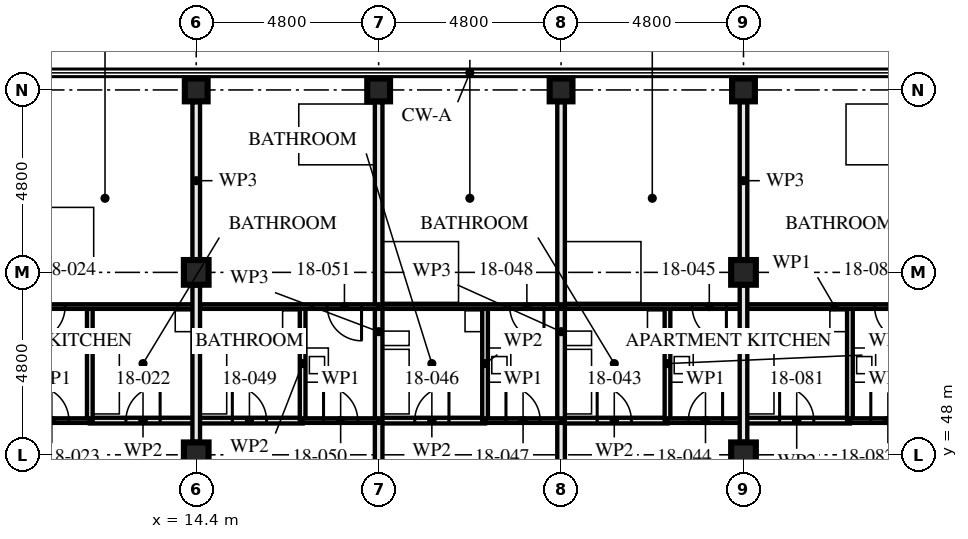
"""IFC4 building model, lengths in metres.
Left out: names, types, materials, properties, quantities, classifications, styles, units other than length and angle.
Written with IfcOpenShell. Run it as: python <this file> out.ifc"""

import sys

from ifc_helpers import new_model, si_unit, direction, frame, frame_2d, origin, origin_2d, place, context, subcontext, project, spatial, rectangle, hollow_rectangle, extrude, element, fill, save


model = new_model("IFC4")
c1 = context("Model", 3, precision=1e-05, world=origin(), true_north=direction((0.0, 1.0)))
c2 = subcontext(c1, "Body", "Model", "MODEL_VIEW")
j1 = project(units=[si_unit("LENGTHUNIT", "METRE"), si_unit("PLANEANGLEUNIT", "RADIAN")], contexts=[c1])
p1 = place(None, origin())
s1 = spatial("IfcSite", under=j1, at=p1, CompositionType="ELEMENT")
p2 = place(p1, origin())
s2 = spatial("IfcBuilding", under=s1, at=p2, CompositionType="ELEMENT")
p3 = place(p2, frame((0.0, 0.0, 69.0)))
s3 = spatial("IfcBuildingStorey", under=s2, at=p3, CompositionType="ELEMENT", Elevation=69.0)
for number, where, z_axis, x_axis in (
    (1, (14.4, 48.0, 0.0), (0.0, 0.0, 1.0), (1.0, 0.0, 0.0)),
    (2, (14.4, 52.8, 0.0), (0.0, 0.0, 1.0), (1.0, 0.0, 0.0)),
):
    element("IfcColumn", number, at=place(p3, frame(where, z_axis=z_axis, x_axis=x_axis)), inside=s3, PredefinedType="COLUMN", context=c2, shape_type="SweptSolid", body=[
        extrude(hollow_rectangle(XDim=0.65, YDim=0.65, WallThickness=0.05, at=origin_2d()), origin(), (0.0, 0.0, 1.0), 3.5),
    ])
for number, where, z_axis, x_axis in (
    (3, (14.4, 57.6, 0.0), (0.0, 0.0, 1.0), (0.0, 1.0, 0.0)),
    (4, (19.2, 57.6, 0.0), (0.0, 0.0, 1.0), (0.0, 1.0, 0.0)),
    (5, (24.0, 57.6, 0.0), (0.0, 0.0, 1.0), (0.0, 1.0, 0.0)),
):
    element("IfcColumn", number, at=place(p3, frame(where, z_axis=z_axis, x_axis=x_axis)), inside=s3, PredefinedType="COLUMN", context=c2, shape_type="SweptSolid", body=[
        extrude(hollow_rectangle(XDim=0.6, YDim=0.6, WallThickness=0.08, at=origin_2d()), origin(), (0.0, 0.0, 1.0), 3.5),
    ])
for number, where, z_axis, x_axis in (
    (6, (28.8, 48.0, 0.0), (0.0, 0.0, 1.0), (1.0, 0.0, 0.0)),
    (7, (28.8, 52.8, 0.0), (0.0, 0.0, 1.0), (1.0, 0.0, 0.0)),
):
    element("IfcColumn", number, at=place(p3, frame(where, z_axis=z_axis, x_axis=x_axis)), inside=s3, PredefinedType="COLUMN", context=c2, shape_type="SweptSolid", body=[
        extrude(hollow_rectangle(XDim=0.65, YDim=0.65, WallThickness=0.05, at=origin_2d()), origin(), (0.0, 0.0, 1.0), 3.5),
    ])
p4 = place(p3, frame((28.8, 57.6, 0.0), z_axis=(0.0, 0.0, 1.0), x_axis=(0.0, 1.0, 0.0)))
e8 = element("IfcColumn", 8, at=p4, inside=s3, PredefinedType="COLUMN", context=c2, shape_type="SweptSolid", body=[
    extrude(hollow_rectangle(XDim=0.6, YDim=0.6, WallThickness=0.08, at=origin_2d()), origin(), (0.0, 0.0, 1.0), 3.5),
])
p5 = place(p3, frame((11.6, 51.9, 0.0), z_axis=(0.0, 0.0, 1.0), x_axis=(0.0, -1.0, 0.0)))
e9 = element("IfcWall", 9, at=p5, inside=s3, PredefinedType="PARTITIONING", context=c2, shape_type="SweptSolid", body=[
    extrude(rectangle(XDim=3.0, YDim=0.15, at=frame_2d((1.5, 0.0))), origin(), (0.0, 0.0, 1.0), 3.33),
])
p6 = place(p3, frame((14.4, 48.9, 0.0), z_axis=(0.0, 0.0, 1.0), x_axis=(-1.0, 0.0, 0.0)))
e10 = element("IfcWall", 10, at=p6, inside=s3, PredefinedType="PARTITIONING", context=c2, shape_type="SweptSolid", body=[
    extrude(rectangle(XDim=2.8, YDim=0.15, at=frame_2d((1.4, 0.0))), origin(), (0.0, 0.0, 1.0), 3.33),
])
p7 = place(p6, frame((0.95, 0.0, 0.0)))
e11 = element("IfcOpeningElement", 11, at=p7, cuts=e10, PredefinedType="OPENING", context=c2, shape_type="SweptSolid", body=[
    extrude(rectangle(XDim=0.9, YDim=2.1, at=frame_2d((0.45, 1.05))), frame((0.0, 0.085, 0.0), z_axis=(0.0, -1.0, 0.0), x_axis=(1.0, 0.0, 0.0)), (0.0, 0.0, 1.0), 0.171),
])
p8 = place(p3, frame((11.6, 48.9, 0.0), z_axis=(0.0, 0.0, 1.0), x_axis=(-1.0, 0.0, 0.0)))
e12 = element("IfcWall", 12, at=p8, inside=s3, PredefinedType="PARTITIONING", context=c2, shape_type="SweptSolid", body=[
    extrude(rectangle(XDim=2.0, YDim=0.12, at=frame_2d((1.0, 0.0))), origin(), (0.0, 0.0, 1.0), 3.33),
])
p9 = place(p8, frame((0.55, 0.0, 0.0)))
e13 = element("IfcOpeningElement", 13, at=p9, cuts=e12, PredefinedType="OPENING", context=c2, shape_type="SweptSolid", body=[
    extrude(rectangle(XDim=0.9, YDim=2.1, at=frame_2d((0.45, 1.05))), frame((0.0, 0.071, 0.0), z_axis=(0.0, -1.0, 0.0), x_axis=(1.0, 0.0, 0.0)), (0.0, 0.0, 1.0), 0.141),
])
p10 = place(p3, frame((14.4, 51.9, 0.0), z_axis=(0.0, 0.0, 1.0), x_axis=(-1.0, 0.0, 0.0)))
e14 = element("IfcWall", 14, at=p10, inside=s3, PredefinedType="PARTITIONING", context=c2, shape_type="SweptSolid", body=[
    extrude(rectangle(XDim=4.8, YDim=0.12, at=frame_2d((2.4, 0.0))), origin(), (0.0, 0.0, 1.0), 3.33),
])
p11 = place(p10, frame((3.45, 0.0, 0.0)))
e15 = element("IfcOpeningElement", 15, at=p11, cuts=e14, PredefinedType="OPENING", context=c2, shape_type="SweptSolid", body=[
    extrude(rectangle(XDim=0.9, YDim=2.1, at=frame_2d((0.45, 1.05))), frame((0.0, 0.071, 0.0), z_axis=(0.0, -1.0, 0.0), x_axis=(1.0, 0.0, 0.0)), (0.0, 0.0, 1.0), 0.141),
])
p12 = place(p3, frame((26.8, 51.9, 0.0), z_axis=(0.0, 0.0, 1.0), x_axis=(0.0, -1.0, 0.0)))
e16 = element("IfcWall", 16, at=p12, inside=s3, PredefinedType="PARTITIONING", context=c2, shape_type="SweptSolid", body=[
    extrude(rectangle(XDim=3.0, YDim=0.15, at=frame_2d((1.5, 0.0))), origin(), (0.0, 0.0, 1.0), 3.33),
])
p13 = place(p3, frame((26.8, 48.9, 0.0), z_axis=(0.0, 0.0, 1.0), x_axis=(-1.0, 0.0, 0.0)))
e17 = element("IfcWall", 17, at=p13, inside=s3, PredefinedType="PARTITIONING", context=c2, shape_type="SweptSolid", body=[
    extrude(rectangle(XDim=2.8, YDim=0.15, at=frame_2d((1.4, 0.0))), origin(), (0.0, 0.0, 1.0), 3.33),
])
p14 = place(p13, frame((0.95, 0.0, 0.0)))
e18 = element("IfcOpeningElement", 18, at=p14, cuts=e17, PredefinedType="OPENING", context=c2, shape_type="SweptSolid", body=[
    extrude(rectangle(XDim=0.9, YDim=2.1, at=frame_2d((0.45, 1.05))), frame((0.0, 0.085, 0.0), z_axis=(0.0, -1.0, 0.0), x_axis=(1.0, 0.0, 0.0)), (0.0, 0.0, 1.0), 0.171),
])
p15 = place(p3, frame((28.8, 48.9, 0.0), z_axis=(0.0, 0.0, 1.0), x_axis=(-1.0, 0.0, 0.0)))
e19 = element("IfcWall", 19, at=p15, inside=s3, PredefinedType="PARTITIONING", context=c2, shape_type="SweptSolid", body=[
    extrude(rectangle(XDim=2.0, YDim=0.12, at=frame_2d((1.0, 0.0))), origin(), (0.0, 0.0, 1.0), 3.33),
])
p16 = place(p15, frame((0.55, 0.0, 0.0)))
e20 = element("IfcOpeningElement", 20, at=p16, cuts=e19, PredefinedType="OPENING", context=c2, shape_type="SweptSolid", body=[
    extrude(rectangle(XDim=0.9, YDim=2.1, at=frame_2d((0.45, 1.05))), frame((0.0, 0.071, 0.0), z_axis=(0.0, -1.0, 0.0), x_axis=(1.0, 0.0, 0.0)), (0.0, 0.0, 1.0), 0.141),
])
p17 = place(p3, frame((28.8, 51.9, 0.0), z_axis=(0.0, 0.0, 1.0), x_axis=(-1.0, 0.0, 0.0)))
e21 = element("IfcWall", 21, at=p17, inside=s3, PredefinedType="PARTITIONING", context=c2, shape_type="SweptSolid", body=[
    extrude(rectangle(XDim=4.8, YDim=0.12, at=frame_2d((2.4, 0.0))), origin(), (0.0, 0.0, 1.0), 3.33),
])
p18 = place(p17, frame((0.45, 0.0, 0.0)))
e22 = element("IfcOpeningElement", 22, at=p18, cuts=e21, PredefinedType="OPENING", context=c2, shape_type="SweptSolid", body=[
    extrude(rectangle(XDim=0.9, YDim=2.1, at=frame_2d((0.45, 1.05))), frame((0.0, 0.071, 0.0), z_axis=(0.0, -1.0, 0.0), x_axis=(1.0, 0.0, 0.0)), (0.0, 0.0, 1.0), 0.141),
])
p19 = place(p3, frame((24.0, 57.28, 0.0), z_axis=(0.0, 0.0, 1.0), x_axis=(0.0, -1.0, 0.0)))
e23 = element("IfcWall", 23, at=p19, inside=s3, PredefinedType="PARTITIONING", context=c2, shape_type="SweptSolid", body=[
    extrude(rectangle(XDim=12.08, YDim=0.2, at=frame_2d((6.04, 0.0))), origin(), (0.0, 0.0, 1.0), 2.55),
])
p20 = place(p3, frame((22.0, 51.9, 0.0), z_axis=(0.0, 0.0, 1.0), x_axis=(0.0, -1.0, 0.0)))
e24 = element("IfcWall", 24, at=p20, inside=s3, PredefinedType="PARTITIONING", context=c2, shape_type="SweptSolid", body=[
    extrude(rectangle(XDim=3.0, YDim=0.15, at=frame_2d((1.5, 0.0))), origin(), (0.0, 0.0, 1.0), 3.33),
])
p21 = place(p3, frame((22.0, 48.9, 0.0), z_axis=(0.0, 0.0, 1.0), x_axis=(-1.0, 0.0, 0.0)))
e25 = element("IfcWall", 25, at=p21, inside=s3, PredefinedType="PARTITIONING", context=c2, shape_type="SweptSolid", body=[
    extrude(rectangle(XDim=2.8, YDim=0.15, at=frame_2d((1.4, 0.0))), origin(), (0.0, 0.0, 1.0), 3.33),
])
p22 = place(p21, frame((0.95, 0.0, 0.0)))
e26 = element("IfcOpeningElement", 26, at=p22, cuts=e25, PredefinedType="OPENING", context=c2, shape_type="SweptSolid", body=[
    extrude(rectangle(XDim=0.9, YDim=2.1, at=frame_2d((0.45, 1.05))), frame((0.0, 0.085, 0.0), z_axis=(0.0, -1.0, 0.0), x_axis=(1.0, 0.0, 0.0)), (0.0, 0.0, 1.0), 0.171),
])
p23 = place(p3, frame((24.0, 48.9, 0.0), z_axis=(0.0, 0.0, 1.0), x_axis=(-1.0, 0.0, 0.0)))
e27 = element("IfcWall", 27, at=p23, inside=s3, PredefinedType="PARTITIONING", context=c2, shape_type="SweptSolid", body=[
    extrude(rectangle(XDim=2.0, YDim=0.12, at=frame_2d((1.0, 0.0))), origin(), (0.0, 0.0, 1.0), 3.33),
])
p24 = place(p23, frame((0.55, 0.0, 0.0)))
e28 = element("IfcOpeningElement", 28, at=p24, cuts=e27, PredefinedType="OPENING", context=c2, shape_type="SweptSolid", body=[
    extrude(rectangle(XDim=0.9, YDim=2.1, at=frame_2d((0.45, 1.05))), frame((0.0, 0.071, 0.0), z_axis=(0.0, -1.0, 0.0), x_axis=(1.0, 0.0, 0.0)), (0.0, 0.0, 1.0), 0.141),
])
p25 = place(p3, frame((24.0, 51.9, 0.0), z_axis=(0.0, 0.0, 1.0), x_axis=(-1.0, 0.0, 0.0)))
e29 = element("IfcWall", 29, at=p25, inside=s3, PredefinedType="PARTITIONING", context=c2, shape_type="SweptSolid", body=[
    extrude(rectangle(XDim=4.8, YDim=0.12, at=frame_2d((2.4, 0.0))), origin(), (0.0, 0.0, 1.0), 3.33),
])
p26 = place(p25, frame((0.45, 0.0, 0.0)))
e30 = element("IfcOpeningElement", 30, at=p26, cuts=e29, PredefinedType="OPENING", context=c2, shape_type="SweptSolid", body=[
    extrude(rectangle(XDim=0.9, YDim=2.1, at=frame_2d((0.45, 1.05))), frame((0.0, 0.071, 0.0), z_axis=(0.0, -1.0, 0.0), x_axis=(1.0, 0.0, 0.0)), (0.0, 0.0, 1.0), 0.141),
])
p27 = place(p3, frame((19.2, 57.28, 0.0), z_axis=(0.0, 0.0, 1.0), x_axis=(0.0, -1.0, 0.0)))
e31 = element("IfcWall", 31, at=p27, inside=s3, PredefinedType="PARTITIONING", context=c2, shape_type="SweptSolid", body=[
    extrude(rectangle(XDim=12.08, YDim=0.2, at=frame_2d((6.04, 0.0))), origin(), (0.0, 0.0, 1.0), 2.55),
])
p28 = place(p3, frame((17.2, 51.9, 0.0), z_axis=(0.0, 0.0, 1.0), x_axis=(0.0, -1.0, 0.0)))
e32 = element("IfcWall", 32, at=p28, inside=s3, PredefinedType="PARTITIONING", context=c2, shape_type="SweptSolid", body=[
    extrude(rectangle(XDim=3.0, YDim=0.15, at=frame_2d((1.5, 0.0))), origin(), (0.0, 0.0, 1.0), 3.33),
])
p29 = place(p3, frame((17.2, 48.9, 0.0), z_axis=(0.0, 0.0, 1.0), x_axis=(-1.0, 0.0, 0.0)))
e33 = element("IfcWall", 33, at=p29, inside=s3, PredefinedType="PARTITIONING", context=c2, shape_type="SweptSolid", body=[
    extrude(rectangle(XDim=2.8, YDim=0.15, at=frame_2d((1.4, 0.0))), origin(), (0.0, 0.0, 1.0), 3.33),
])
p30 = place(p29, frame((0.95, 0.0, 0.0)))
e34 = element("IfcOpeningElement", 34, at=p30, cuts=e33, PredefinedType="OPENING", context=c2, shape_type="SweptSolid", body=[
    extrude(rectangle(XDim=0.9, YDim=2.1, at=frame_2d((0.45, 1.05))), frame((0.0, 0.085, 0.0), z_axis=(0.0, -1.0, 0.0), x_axis=(1.0, 0.0, 0.0)), (0.0, 0.0, 1.0), 0.171),
])
p31 = place(p3, frame((19.2, 48.9, 0.0), z_axis=(0.0, 0.0, 1.0), x_axis=(-1.0, 0.0, 0.0)))
e35 = element("IfcWall", 35, at=p31, inside=s3, PredefinedType="PARTITIONING", context=c2, shape_type="SweptSolid", body=[
    extrude(rectangle(XDim=2.0, YDim=0.12, at=frame_2d((1.0, 0.0))), origin(), (0.0, 0.0, 1.0), 3.33),
])
p32 = place(p31, frame((0.55, 0.0, 0.0)))
e36 = element("IfcOpeningElement", 36, at=p32, cuts=e35, PredefinedType="OPENING", context=c2, shape_type="SweptSolid", body=[
    extrude(rectangle(XDim=0.9, YDim=2.1, at=frame_2d((0.45, 1.05))), frame((0.0, 0.071, 0.0), z_axis=(0.0, -1.0, 0.0), x_axis=(1.0, 0.0, 0.0)), (0.0, 0.0, 1.0), 0.141),
])
p33 = place(p3, frame((19.2, 51.9, 0.0), z_axis=(0.0, 0.0, 1.0), x_axis=(-1.0, 0.0, 0.0)))
e37 = element("IfcWall", 37, at=p33, inside=s3, PredefinedType="PARTITIONING", context=c2, shape_type="SweptSolid", body=[
    extrude(rectangle(XDim=4.8, YDim=0.12, at=frame_2d((2.4, 0.0))), origin(), (0.0, 0.0, 1.0), 3.33),
])
p34 = place(p33, frame((0.45, 0.0, 0.0)))
e38 = element("IfcOpeningElement", 38, at=p34, cuts=e37, PredefinedType="OPENING", context=c2, shape_type="SweptSolid", body=[
    extrude(rectangle(XDim=0.9, YDim=2.1, at=frame_2d((0.45, 1.05))), frame((0.0, 0.071, 0.0), z_axis=(0.0, -1.0, 0.0), x_axis=(1.0, 0.0, 0.0)), (0.0, 0.0, 1.0), 0.141),
])
p35 = place(p3, frame((31.6, 51.9, 0.0), z_axis=(0.0, 0.0, 1.0), x_axis=(0.0, -1.0, 0.0)))
e39 = element("IfcWall", 39, at=p35, inside=s3, PredefinedType="PARTITIONING", context=c2, shape_type="SweptSolid", body=[
    extrude(rectangle(XDim=3.0, YDim=0.15, at=frame_2d((1.5, 0.0))), origin(), (0.0, 0.0, 1.0), 3.33),
])
p36 = place(p3, frame((31.6, 48.9, 0.0), z_axis=(0.0, 0.0, 1.0), x_axis=(-1.0, 0.0, 0.0)))
e40 = element("IfcWall", 40, at=p36, inside=s3, PredefinedType="PARTITIONING", context=c2, shape_type="SweptSolid", body=[
    extrude(rectangle(XDim=2.8, YDim=0.15, at=frame_2d((1.4, 0.0))), origin(), (0.0, 0.0, 1.0), 3.33),
])
p37 = place(p36, frame((0.95, 0.0, 0.0)))
e41 = element("IfcOpeningElement", 41, at=p37, cuts=e40, PredefinedType="OPENING", context=c2, shape_type="SweptSolid", body=[
    extrude(rectangle(XDim=0.9, YDim=2.1, at=frame_2d((0.45, 1.05))), frame((0.0, 0.085, 0.0), z_axis=(0.0, -1.0, 0.0), x_axis=(1.0, 0.0, 0.0)), (0.0, 0.0, 1.0), 0.171),
])
p38 = place(p3, frame((33.6, 48.9, 0.0), z_axis=(0.0, 0.0, 1.0), x_axis=(-1.0, 0.0, 0.0)))
e42 = element("IfcWall", 42, at=p38, inside=s3, PredefinedType="PARTITIONING", context=c2, shape_type="SweptSolid", body=[
    extrude(rectangle(XDim=2.0, YDim=0.12, at=frame_2d((1.0, 0.0))), origin(), (0.0, 0.0, 1.0), 3.33),
])
p39 = place(p38, frame((0.55, 0.0, 0.0)))
e43 = element("IfcOpeningElement", 43, at=p39, cuts=e42, PredefinedType="OPENING", context=c2, shape_type="SweptSolid", body=[
    extrude(rectangle(XDim=0.9, YDim=2.1, at=frame_2d((0.45, 1.05))), frame((0.0, 0.071, 0.0), z_axis=(0.0, -1.0, 0.0), x_axis=(1.0, 0.0, 0.0)), (0.0, 0.0, 1.0), 0.141),
])
p40 = place(p3, frame((33.6, 51.9, 0.0), z_axis=(0.0, 0.0, 1.0), x_axis=(-1.0, 0.0, 0.0)))
e44 = element("IfcWall", 44, at=p40, inside=s3, PredefinedType="PARTITIONING", context=c2, shape_type="SweptSolid", body=[
    extrude(rectangle(XDim=4.8, YDim=0.12, at=frame_2d((2.4, 0.0))), origin(), (0.0, 0.0, 1.0), 3.33),
])
p41 = place(p40, frame((0.45, 0.0, 0.0)))
e45 = element("IfcOpeningElement", 45, at=p41, cuts=e44, PredefinedType="OPENING", context=c2, shape_type="SweptSolid", body=[
    extrude(rectangle(XDim=0.9, YDim=2.1, at=frame_2d((0.45, 1.05))), frame((0.0, 0.071, 0.0), z_axis=(0.0, -1.0, 0.0), x_axis=(1.0, 0.0, 0.0)), (0.0, 0.0, 1.0), 0.141),
])
p42 = place(p3, frame((14.4, 48.345, 0.0), z_axis=(0.0, 0.0, 1.0), x_axis=(0.0, 1.0, 0.0)))
e46 = element("IfcWall", 46, at=p42, inside=s3, PredefinedType="PARTITIONING", context=c2, shape_type="SweptSolid", body=[
    extrude(rectangle(XDim=4.11, YDim=0.2, at=frame_2d((2.055, 0.0))), origin(), (0.0, 0.0, 1.0), 2.32),
])
p43 = place(p3, frame((14.4, 53.145, 0.0), z_axis=(0.0, 0.0, 1.0), x_axis=(0.0, 1.0, 0.0)))
e47 = element("IfcWall", 47, at=p43, inside=s3, PredefinedType="PARTITIONING", context=c2, shape_type="SweptSolid", body=[
    extrude(rectangle(XDim=4.135, YDim=0.2, at=frame_2d((2.067, 0.0))), origin(), (0.0, 0.0, 1.0), 2.32),
])
p44 = place(p3, frame((28.8, 48.345, 0.0), z_axis=(0.0, 0.0, 1.0), x_axis=(0.0, 1.0, 0.0)))
e48 = element("IfcWall", 48, at=p44, inside=s3, PredefinedType="PARTITIONING", context=c2, shape_type="SweptSolid", body=[
    extrude(rectangle(XDim=4.11, YDim=0.2, at=frame_2d((2.055, 0.0))), origin(), (0.0, 0.0, 1.0), 2.32),
])
p45 = place(p3, frame((28.8, 53.145, 0.0), z_axis=(0.0, 0.0, 1.0), x_axis=(0.0, 1.0, 0.0)))
e49 = element("IfcWall", 49, at=p45, inside=s3, PredefinedType="PARTITIONING", context=c2, shape_type="SweptSolid", body=[
    extrude(rectangle(XDim=4.135, YDim=0.2, at=frame_2d((2.067, 0.0))), origin(), (0.0, 0.0, 1.0), 2.32),
])
p46 = place(p7, frame((0.9, 0.0, 0.0), z_axis=(0.0, 0.0, 1.0), x_axis=(-1.0, 0.0, 0.0)))
e50 = element("IfcDoor", 50, at=p46, inside=s3, OperationType="SINGLE_SWING_LEFT", PredefinedType="DOOR", context=c2, shape_type="SweptSolid", body=[
    extrude(rectangle(XDim=0.9, YDim=2.1, at=frame_2d((0.45, 1.05))), frame((0.0, 0.022, 0.0), z_axis=(0.0, -1.0, 0.0), x_axis=(1.0, 0.0, 0.0)), (0.0, 0.0, 1.0), 0.044),
])
fill(e11, e50)
p47 = place(p9, frame((0.9, 0.0, 0.0), z_axis=(0.0, 0.0, 1.0), x_axis=(-1.0, 0.0, 0.0)))
e51 = element("IfcDoor", 51, at=p47, inside=s3, OperationType="SINGLE_SWING_RIGHT", PredefinedType="DOOR", context=c2, shape_type="SweptSolid", body=[
    extrude(rectangle(XDim=0.9, YDim=2.1, at=frame_2d((0.45, 1.05))), frame((0.0, 0.022, 0.0), z_axis=(0.0, -1.0, 0.0), x_axis=(1.0, 0.0, 0.0)), (0.0, 0.0, 1.0), 0.044),
])
fill(e13, e51)
p48 = place(p11, origin())
e52 = element("IfcDoor", 52, at=p48, inside=s3, OperationType="SINGLE_SWING_LEFT", PredefinedType="DOOR", context=c2, shape_type="SweptSolid", body=[
    extrude(rectangle(XDim=0.9, YDim=2.1, at=frame_2d((0.45, 1.05))), frame((0.0, 0.022, 0.0), z_axis=(0.0, -1.0, 0.0), x_axis=(1.0, 0.0, 0.0)), (0.0, 0.0, 1.0), 0.044),
])
fill(e15, e52)
p49 = place(p14, frame((0.9, 0.0, 0.0), z_axis=(0.0, 0.0, 1.0), x_axis=(-1.0, 0.0, 0.0)))
e53 = element("IfcDoor", 53, at=p49, inside=s3, OperationType="SINGLE_SWING_RIGHT", PredefinedType="DOOR", context=c2, shape_type="SweptSolid", body=[
    extrude(rectangle(XDim=0.9, YDim=2.1, at=frame_2d((0.45, 1.05))), frame((0.0, 0.022, 0.0), z_axis=(0.0, -1.0, 0.0), x_axis=(1.0, 0.0, 0.0)), (0.0, 0.0, 1.0), 0.044),
])
fill(e18, e53)
p50 = place(p16, frame((0.9, 0.0, 0.0), z_axis=(0.0, 0.0, 1.0), x_axis=(-1.0, 0.0, 0.0)))
e54 = element("IfcDoor", 54, at=p50, inside=s3, OperationType="SINGLE_SWING_LEFT", PredefinedType="DOOR", context=c2, shape_type="SweptSolid", body=[
    extrude(rectangle(XDim=0.9, YDim=2.1, at=frame_2d((0.45, 1.05))), frame((0.0, 0.022, 0.0), z_axis=(0.0, -1.0, 0.0), x_axis=(1.0, 0.0, 0.0)), (0.0, 0.0, 1.0), 0.044),
])
fill(e20, e54)
p51 = place(p18, origin())
e55 = element("IfcDoor", 55, at=p51, inside=s3, OperationType="SINGLE_SWING_RIGHT", PredefinedType="DOOR", context=c2, shape_type="SweptSolid", body=[
    extrude(rectangle(XDim=0.9, YDim=2.1, at=frame_2d((0.45, 1.05))), frame((0.0, 0.022, 0.0), z_axis=(0.0, -1.0, 0.0), x_axis=(1.0, 0.0, 0.0)), (0.0, 0.0, 1.0), 0.044),
])
fill(e22, e55)
p52 = place(p22, frame((0.9, 0.0, 0.0), z_axis=(0.0, 0.0, 1.0), x_axis=(-1.0, 0.0, 0.0)))
e56 = element("IfcDoor", 56, at=p52, inside=s3, OperationType="SINGLE_SWING_LEFT", PredefinedType="DOOR", context=c2, shape_type="SweptSolid", body=[
    extrude(rectangle(XDim=0.9, YDim=2.1, at=frame_2d((0.45, 1.05))), frame((0.0, 0.022, 0.0), z_axis=(0.0, -1.0, 0.0), x_axis=(1.0, 0.0, 0.0)), (0.0, 0.0, 1.0), 0.044),
])
fill(e26, e56)
p53 = place(p24, frame((0.9, 0.0, 0.0), z_axis=(0.0, 0.0, 1.0), x_axis=(-1.0, 0.0, 0.0)))
e57 = element("IfcDoor", 57, at=p53, inside=s3, OperationType="SINGLE_SWING_RIGHT", PredefinedType="DOOR", context=c2, shape_type="SweptSolid", body=[
    extrude(rectangle(XDim=0.9, YDim=2.1, at=frame_2d((0.45, 1.05))), frame((0.0, 0.022, 0.0), z_axis=(0.0, -1.0, 0.0), x_axis=(1.0, 0.0, 0.0)), (0.0, 0.0, 1.0), 0.044),
])
fill(e28, e57)
p54 = place(p26, origin())
e58 = element("IfcDoor", 58, at=p54, inside=s3, OperationType="SINGLE_SWING_RIGHT", PredefinedType="DOOR", context=c2, shape_type="SweptSolid", body=[
    extrude(rectangle(XDim=0.9, YDim=2.1, at=frame_2d((0.45, 1.05))), frame((0.0, 0.022, 0.0), z_axis=(0.0, -1.0, 0.0), x_axis=(1.0, 0.0, 0.0)), (0.0, 0.0, 1.0), 0.044),
])
fill(e30, e58)
p55 = place(p30, frame((0.9, 0.0, 0.0), z_axis=(0.0, 0.0, 1.0), x_axis=(-1.0, 0.0, 0.0)))
e59 = element("IfcDoor", 59, at=p55, inside=s3, OperationType="SINGLE_SWING_RIGHT", PredefinedType="DOOR", context=c2, shape_type="SweptSolid", body=[
    extrude(rectangle(XDim=0.9, YDim=2.1, at=frame_2d((0.45, 1.05))), frame((0.0, 0.022, 0.0), z_axis=(0.0, -1.0, 0.0), x_axis=(1.0, 0.0, 0.0)), (0.0, 0.0, 1.0), 0.044),
])
fill(e34, e59)
p56 = place(p32, frame((0.9, 0.0, 0.0), z_axis=(0.0, 0.0, 1.0), x_axis=(-1.0, 0.0, 0.0)))
e60 = element("IfcDoor", 60, at=p56, inside=s3, OperationType="SINGLE_SWING_RIGHT", PredefinedType="DOOR", context=c2, shape_type="SweptSolid", body=[
    extrude(rectangle(XDim=0.9, YDim=2.1, at=frame_2d((0.45, 1.05))), frame((0.0, 0.022, 0.0), z_axis=(0.0, -1.0, 0.0), x_axis=(1.0, 0.0, 0.0)), (0.0, 0.0, 1.0), 0.044),
])
fill(e36, e60)
p57 = place(p34, origin())
e61 = element("IfcDoor", 61, at=p57, inside=s3, OperationType="SINGLE_SWING_RIGHT", PredefinedType="DOOR", context=c2, shape_type="SweptSolid", body=[
    extrude(rectangle(XDim=0.9, YDim=2.1, at=frame_2d((0.45, 1.05))), frame((0.0, 0.022, 0.0), z_axis=(0.0, -1.0, 0.0), x_axis=(1.0, 0.0, 0.0)), (0.0, 0.0, 1.0), 0.044),
])
fill(e38, e61)
p58 = place(p37, frame((0.9, 0.0, 0.0), z_axis=(0.0, 0.0, 1.0), x_axis=(-1.0, 0.0, 0.0)))
e62 = element("IfcDoor", 62, at=p58, inside=s3, OperationType="SINGLE_SWING_RIGHT", PredefinedType="DOOR", context=c2, shape_type="SweptSolid", body=[
    extrude(rectangle(XDim=0.9, YDim=2.1, at=frame_2d((0.45, 1.05))), frame((0.0, 0.022, 0.0), z_axis=(0.0, -1.0, 0.0), x_axis=(1.0, 0.0, 0.0)), (0.0, 0.0, 1.0), 0.044),
])
fill(e41, e62)
p59 = place(p39, frame((0.9, 0.0, 0.0), z_axis=(0.0, 0.0, 1.0), x_axis=(-1.0, 0.0, 0.0)))
e63 = element("IfcDoor", 63, at=p59, inside=s3, OperationType="SINGLE_SWING_RIGHT", PredefinedType="DOOR", context=c2, shape_type="SweptSolid", body=[
    extrude(rectangle(XDim=0.9, YDim=2.1, at=frame_2d((0.45, 1.05))), frame((0.0, 0.022, 0.0), z_axis=(0.0, -1.0, 0.0), x_axis=(1.0, 0.0, 0.0)), (0.0, 0.0, 1.0), 0.044),
])
fill(e43, e63)
p60 = place(p41, origin())
e64 = element("IfcDoor", 64, at=p60, inside=s3, OperationType="SINGLE_SWING_RIGHT", PredefinedType="DOOR", context=c2, shape_type="SweptSolid", body=[
    extrude(rectangle(XDim=0.9, YDim=2.1, at=frame_2d((0.45, 1.05))), frame((0.0, 0.022, 0.0), z_axis=(0.0, -1.0, 0.0), x_axis=(1.0, 0.0, 0.0)), (0.0, 0.0, 1.0), 0.044),
])
fill(e45, e64)
save(model, sys.argv[1])
